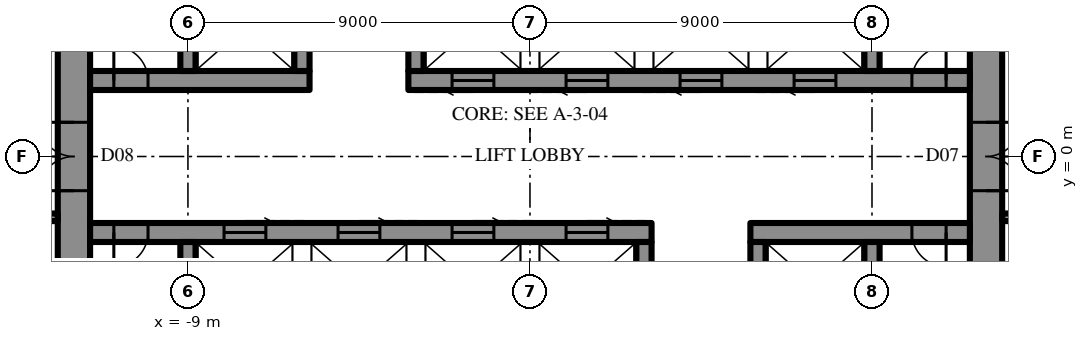
"""IFC4 building model, lengths in metres.
Left out: names, types, materials, properties, quantities, classifications, styles, units other than length and angle.
Written with IfcOpenShell. Run it as: python <this file> out.ifc"""

import sys

from ifc_helpers import new_model, si_unit, direction, frame, frame_2d, origin, place, context, subcontext, project, spatial, rectangle, extrude, element, fill, save


model = new_model("IFC4")
c1 = context("Model", 3, precision=1e-05, world=origin(), true_north=direction((0.0, 1.0)))
c2 = subcontext(c1, "Body", "Model", "MODEL_VIEW")
j1 = project(units=[si_unit("LENGTHUNIT", "METRE"), si_unit("PLANEANGLEUNIT", "RADIAN")], contexts=[c1])
p1 = place(None, origin())
s1 = spatial("IfcSite", under=j1, at=p1, CompositionType="ELEMENT")
p2 = place(p1, origin())
s2 = spatial("IfcBuilding", under=s1, at=p2, CompositionType="ELEMENT")
p3 = place(p2, frame((0.0, 0.0, 328.3)))
s3 = spatial("IfcBuildingStorey", under=s2, at=p3, CompositionType="ELEMENT", Elevation=328.3)
p4 = place(p3, frame((12.0, -10.7, 0.0), z_axis=(0.0, 0.0, 1.0), x_axis=(0.0, 1.0, 0.0)))
e1 = element("IfcWall", 1, at=p4, inside=s3, PredefinedType="SHEAR", context=c2, shape_type="SweptSolid", body=[
    extrude(rectangle(XDim=21.4, YDim=0.85, at=frame_2d((10.7, 0.0))), origin(), (0.0, 0.0, 1.0), 4.2),
])
p5 = place(p4, frame((9.8, 0.0, 0.0)))
e2 = element("IfcOpeningElement", 2, at=p5, cuts=e1, PredefinedType="OPENING", context=c2, shape_type="SweptSolid", body=[
    extrude(rectangle(XDim=1.8, YDim=2.4, at=frame_2d((0.9, 1.2))), frame((0.0, 0.435, 0.0), z_axis=(0.0, -1.0, 0.0), x_axis=(1.0, 0.0, 0.0)), (0.0, 0.0, 1.0), 0.87),
])
p6 = place(p3, frame((-12.0, 10.7, 0.0), z_axis=(0.0, 0.0, 1.0), x_axis=(0.0, -1.0, 0.0)))
e3 = element("IfcWall", 3, at=p6, inside=s3, PredefinedType="SHEAR", context=c2, shape_type="SweptSolid", body=[
    extrude(rectangle(XDim=21.4, YDim=0.85, at=frame_2d((10.7, 0.0))), origin(), (0.0, 0.0, 1.0), 4.2),
])
p7 = place(p6, frame((9.8, 0.0, 0.0)))
e4 = element("IfcOpeningElement", 4, at=p7, cuts=e3, PredefinedType="OPENING", context=c2, shape_type="SweptSolid", body=[
    extrude(rectangle(XDim=1.8, YDim=2.4, at=frame_2d((0.9, 1.2))), frame((0.0, 0.435, 0.0), z_axis=(0.0, -1.0, 0.0), x_axis=(1.0, 0.0, 0.0)), (0.0, 0.0, 1.0), 0.87),
])
p8 = place(p3, frame((-11.575, 2.0, 0.0), z_axis=(0.0, 0.0, 1.0), x_axis=(1.0, 0.0, 0.0)))
e5 = element("IfcWall", 5, at=p8, inside=s3, PredefinedType="SHEAR", context=c2, shape_type="SweptSolid", body=[
    extrude(rectangle(XDim=5.775, YDim=0.5, at=frame_2d((2.887, 0.0))), origin(), (0.0, 0.0, 1.0), 4.2),
])
p9 = place(p8, frame((0.625, 0.0, 0.0)))
e6 = element("IfcOpeningElement", 6, at=p9, cuts=e5, PredefinedType="OPENING", context=c2, shape_type="SweptSolid", body=[
    extrude(rectangle(XDim=0.9, YDim=2.2, at=frame_2d((0.45, 1.1))), frame((0.0, 0.26, 0.0), z_axis=(0.0, -1.0, 0.0), x_axis=(1.0, 0.0, 0.0)), (0.0, 0.0, 1.0), 0.52),
])
p10 = place(p3, frame((-3.2, 2.0, 0.0), z_axis=(0.0, 0.0, 1.0), x_axis=(1.0, 0.0, 0.0)))
e7 = element("IfcWall", 7, at=p10, inside=s3, PredefinedType="SHEAR", context=c2, shape_type="SweptSolid", body=[
    extrude(rectangle(XDim=14.775, YDim=0.5, at=frame_2d((7.387, 0.0))), origin(), (0.0, 0.0, 1.0), 4.2),
])
p11 = place(p10, frame((13.25, 0.0, 0.0)))
e8 = element("IfcOpeningElement", 8, at=p11, cuts=e7, PredefinedType="OPENING", context=c2, shape_type="SweptSolid", body=[
    extrude(rectangle(XDim=0.9, YDim=2.2, at=frame_2d((0.45, 1.1))), frame((0.0, 0.26, 0.0), z_axis=(0.0, -1.0, 0.0), x_axis=(1.0, 0.0, 0.0)), (0.0, 0.0, 1.0), 0.52),
])
p12 = place(p10, frame((1.15, 0.0, 0.0)))
e9 = element("IfcOpeningElement", 9, at=p12, cuts=e7, PredefinedType="OPENING", context=c2, shape_type="SweptSolid", body=[
    extrude(rectangle(XDim=1.1, YDim=2.2, at=frame_2d((0.55, 1.1))), frame((0.0, 0.26, 0.0), z_axis=(0.0, -1.0, 0.0), x_axis=(1.0, 0.0, 0.0)), (0.0, 0.0, 1.0), 0.52),
])
p13 = place(p10, frame((4.15, 0.0, 0.0)))
e10 = element("IfcOpeningElement", 10, at=p13, cuts=e7, PredefinedType="OPENING", context=c2, shape_type="SweptSolid", body=[
    extrude(rectangle(XDim=1.1, YDim=2.2, at=frame_2d((0.55, 1.1))), frame((0.0, 0.26, 0.0), z_axis=(0.0, -1.0, 0.0), x_axis=(1.0, 0.0, 0.0)), (0.0, 0.0, 1.0), 0.52),
])
p14 = place(p10, frame((7.15, 0.0, 0.0)))
e11 = element("IfcOpeningElement", 11, at=p14, cuts=e7, PredefinedType="OPENING", context=c2, shape_type="SweptSolid", body=[
    extrude(rectangle(XDim=1.1, YDim=2.2, at=frame_2d((0.55, 1.1))), frame((0.0, 0.26, 0.0), z_axis=(0.0, -1.0, 0.0), x_axis=(1.0, 0.0, 0.0)), (0.0, 0.0, 1.0), 0.52),
])
p15 = place(p10, frame((10.15, 0.0, 0.0)))
e12 = element("IfcOpeningElement", 12, at=p15, cuts=e7, PredefinedType="OPENING", context=c2, shape_type="SweptSolid", body=[
    extrude(rectangle(XDim=1.1, YDim=2.2, at=frame_2d((0.55, 1.1))), frame((0.0, 0.26, 0.0), z_axis=(0.0, -1.0, 0.0), x_axis=(1.0, 0.0, 0.0)), (0.0, 0.0, 1.0), 0.52),
])
for number, where, z_axis, x_axis in (
    (13, (-9.0, 2.25, 0.0), (0.0, 0.0, 1.0), (0.0, 1.0, 0.0)),
    (14, (-6.0, 2.25, 0.0), (0.0, 0.0, 1.0), (0.0, 1.0, 0.0)),
    (15, (-3.0, 2.25, 0.0), (0.0, 0.0, 1.0), (0.0, 1.0, 0.0)),
    (16, (9.0, 2.25, 0.0), (0.0, 0.0, 1.0), (0.0, 1.0, 0.0)),
):
    element("IfcWall", number, at=place(p3, frame(where, z_axis=z_axis, x_axis=x_axis)), inside=s3, PredefinedType="SHEAR", context=c2, shape_type="SweptSolid", body=[
        extrude(rectangle(XDim=2.3, YDim=0.4, at=frame_2d((1.15, 0.0))), origin(), (0.0, 0.0, 1.0), 4.2),
    ])
p16 = place(p3, frame((11.575, -2.0, 0.0), z_axis=(0.0, 0.0, 1.0), x_axis=(-1.0, 0.0, 0.0)))
e17 = element("IfcWall", 17, at=p16, inside=s3, PredefinedType="SHEAR", context=c2, shape_type="SweptSolid", body=[
    extrude(rectangle(XDim=5.775, YDim=0.5, at=frame_2d((2.887, 0.0))), origin(), (0.0, 0.0, 1.0), 4.2),
])
p17 = place(p16, frame((0.625, 0.0, 0.0)))
e18 = element("IfcOpeningElement", 18, at=p17, cuts=e17, PredefinedType="OPENING", context=c2, shape_type="SweptSolid", body=[
    extrude(rectangle(XDim=0.9, YDim=2.2, at=frame_2d((0.45, 1.1))), frame((0.0, 0.26, 0.0), z_axis=(0.0, -1.0, 0.0), x_axis=(1.0, 0.0, 0.0)), (0.0, 0.0, 1.0), 0.52),
])
p18 = place(p3, frame((3.2, -2.0, 0.0), z_axis=(0.0, 0.0, 1.0), x_axis=(-1.0, 0.0, 0.0)))
e19 = element("IfcWall", 19, at=p18, inside=s3, PredefinedType="SHEAR", context=c2, shape_type="SweptSolid", body=[
    extrude(rectangle(XDim=14.775, YDim=0.5, at=frame_2d((7.387, 0.0))), origin(), (0.0, 0.0, 1.0), 4.2),
])
p19 = place(p18, frame((13.25, 0.0, 0.0)))
e20 = element("IfcOpeningElement", 20, at=p19, cuts=e19, PredefinedType="OPENING", context=c2, shape_type="SweptSolid", body=[
    extrude(rectangle(XDim=0.9, YDim=2.2, at=frame_2d((0.45, 1.1))), frame((0.0, 0.26, 0.0), z_axis=(0.0, -1.0, 0.0), x_axis=(1.0, 0.0, 0.0)), (0.0, 0.0, 1.0), 0.52),
])
p20 = place(p18, frame((1.15, 0.0, 0.0)))
e21 = element("IfcOpeningElement", 21, at=p20, cuts=e19, PredefinedType="OPENING", context=c2, shape_type="SweptSolid", body=[
    extrude(rectangle(XDim=1.1, YDim=2.2, at=frame_2d((0.55, 1.1))), frame((0.0, 0.26, 0.0), z_axis=(0.0, -1.0, 0.0), x_axis=(1.0, 0.0, 0.0)), (0.0, 0.0, 1.0), 0.52),
])
p21 = place(p18, frame((4.15, 0.0, 0.0)))
e22 = element("IfcOpeningElement", 22, at=p21, cuts=e19, PredefinedType="OPENING", context=c2, shape_type="SweptSolid", body=[
    extrude(rectangle(XDim=1.1, YDim=2.2, at=frame_2d((0.55, 1.1))), frame((0.0, 0.26, 0.0), z_axis=(0.0, -1.0, 0.0), x_axis=(1.0, 0.0, 0.0)), (0.0, 0.0, 1.0), 0.52),
])
p22 = place(p18, frame((7.15, 0.0, 0.0)))
e23 = element("IfcOpeningElement", 23, at=p22, cuts=e19, PredefinedType="OPENING", context=c2, shape_type="SweptSolid", body=[
    extrude(rectangle(XDim=1.1, YDim=2.2, at=frame_2d((0.55, 1.1))), frame((0.0, 0.26, 0.0), z_axis=(0.0, -1.0, 0.0), x_axis=(1.0, 0.0, 0.0)), (0.0, 0.0, 1.0), 0.52),
])
p23 = place(p18, frame((10.15, 0.0, 0.0)))
e24 = element("IfcOpeningElement", 24, at=p23, cuts=e19, PredefinedType="OPENING", context=c2, shape_type="SweptSolid", body=[
    extrude(rectangle(XDim=1.1, YDim=2.2, at=frame_2d((0.55, 1.1))), frame((0.0, 0.26, 0.0), z_axis=(0.0, -1.0, 0.0), x_axis=(1.0, 0.0, 0.0)), (0.0, 0.0, 1.0), 0.52),
])
for number, where, z_axis, x_axis in (
    (25, (9.0, -2.25, 0.0), (0.0, 0.0, 1.0), (0.0, -1.0, 0.0)),
    (26, (6.0, -2.25, 0.0), (0.0, 0.0, 1.0), (0.0, -1.0, 0.0)),
    (27, (3.0, -2.25, 0.0), (0.0, 0.0, 1.0), (0.0, -1.0, 0.0)),
    (28, (-9.0, -2.25, 0.0), (0.0, 0.0, 1.0), (0.0, -1.0, 0.0)),
):
    element("IfcWall", number, at=place(p3, frame(where, z_axis=z_axis, x_axis=x_axis)), inside=s3, PredefinedType="SHEAR", context=c2, shape_type="SweptSolid", body=[
        extrude(rectangle(XDim=2.3, YDim=0.4, at=frame_2d((1.15, 0.0))), origin(), (0.0, 0.0, 1.0), 4.2),
    ])
p24 = place(p3, frame((12.425, -1.6, 0.0), z_axis=(0.0, 0.0, 1.0), x_axis=(1.0, 0.0, 0.0)))
e29 = element("IfcWall", 29, at=p24, inside=s3, PredefinedType="PARTITIONING", context=c2, shape_type="SweptSolid", body=[
    extrude(rectangle(XDim=16.327, YDim=0.2, at=frame_2d((8.164, 0.0))), origin(), (0.0, 0.0, 1.0), 4.0),
])
p25 = place(p24, frame((1.133, 0.0, 0.0)))
e30 = element("IfcOpeningElement", 30, at=p25, cuts=e29, PredefinedType="OPENING", context=c2, shape_type="SweptSolid", body=[
    extrude(rectangle(XDim=1.0, YDim=2.2, at=frame_2d((0.5, 1.1))), frame((0.0, 0.11, 0.0), z_axis=(0.0, -1.0, 0.0), x_axis=(1.0, 0.0, 0.0)), (0.0, 0.0, 1.0), 0.22),
])
p26 = place(p3, frame((-12.425, -1.6, 0.0), z_axis=(0.0, 0.0, 1.0), x_axis=(-1.0, 0.0, 0.0)))
e31 = element("IfcWall", 31, at=p26, inside=s3, PredefinedType="PARTITIONING", context=c2, shape_type="SweptSolid", body=[
    extrude(rectangle(XDim=16.327, YDim=0.2, at=frame_2d((8.164, 0.0))), origin(), (0.0, 0.0, 1.0), 4.0),
])
p27 = place(p26, frame((1.133, 0.0, 0.0)))
e32 = element("IfcOpeningElement", 32, at=p27, cuts=e31, PredefinedType="OPENING", context=c2, shape_type="SweptSolid", body=[
    extrude(rectangle(XDim=1.0, YDim=2.2, at=frame_2d((0.5, 1.1))), frame((0.0, 0.11, 0.0), z_axis=(0.0, -1.0, 0.0), x_axis=(1.0, 0.0, 0.0)), (0.0, 0.0, 1.0), 0.22),
])
p28 = place(p5, frame((1.8, 0.0, 0.0), z_axis=(0.0, 0.0, 1.0), x_axis=(-1.0, 0.0, 0.0)))
e33 = element("IfcDoor", 33, at=p28, inside=s3, OperationType="DOUBLE_DOOR_SINGLE_SWING", PredefinedType="DOOR", context=c2, shape_type="SweptSolid", body=[
    extrude(rectangle(XDim=1.8, YDim=2.4, at=frame_2d((0.9, 1.2))), frame((0.0, 0.025, 0.0), z_axis=(0.0, -1.0, 0.0), x_axis=(1.0, 0.0, 0.0)), (0.0, 0.0, 1.0), 0.05),
])
fill(e2, e33)
p29 = place(p7, frame((1.8, 0.0, 0.0), z_axis=(0.0, 0.0, 1.0), x_axis=(-1.0, 0.0, 0.0)))
e34 = element("IfcDoor", 34, at=p29, inside=s3, OperationType="DOUBLE_DOOR_SINGLE_SWING", PredefinedType="DOOR", context=c2, shape_type="SweptSolid", body=[
    extrude(rectangle(XDim=1.8, YDim=2.4, at=frame_2d((0.9, 1.2))), frame((0.0, 0.025, 0.0), z_axis=(0.0, -1.0, 0.0), x_axis=(1.0, 0.0, 0.0)), (0.0, 0.0, 1.0), 0.05),
])
fill(e4, e34)
p30 = place(p9, origin())
e35 = element("IfcDoor", 35, at=p30, inside=s3, OperationType="SINGLE_SWING_RIGHT", PredefinedType="DOOR", context=c2, shape_type="SweptSolid", body=[
    extrude(rectangle(XDim=0.9, YDim=2.2, at=frame_2d((0.45, 1.1))), frame((0.0, 0.025, 0.0), z_axis=(0.0, -1.0, 0.0), x_axis=(1.0, 0.0, 0.0)), (0.0, 0.0, 1.0), 0.05),
])
fill(e6, e35)
p31 = place(p11, origin())
e36 = element("IfcDoor", 36, at=p31, inside=s3, OperationType="SINGLE_SWING_LEFT", PredefinedType="DOOR", context=c2, shape_type="SweptSolid", body=[
    extrude(rectangle(XDim=0.9, YDim=2.2, at=frame_2d((0.45, 1.1))), frame((0.0, 0.025, 0.0), z_axis=(0.0, -1.0, 0.0), x_axis=(1.0, 0.0, 0.0)), (0.0, 0.0, 1.0), 0.05),
])
fill(e8, e36)
p32 = place(p17, origin())
e37 = element("IfcDoor", 37, at=p32, inside=s3, OperationType="SINGLE_SWING_RIGHT", PredefinedType="DOOR", context=c2, shape_type="SweptSolid", body=[
    extrude(rectangle(XDim=0.9, YDim=2.2, at=frame_2d((0.45, 1.1))), frame((0.0, 0.025, 0.0), z_axis=(0.0, -1.0, 0.0), x_axis=(1.0, 0.0, 0.0)), (0.0, 0.0, 1.0), 0.05),
])
fill(e18, e37)
p33 = place(p19, origin())
e38 = element("IfcDoor", 38, at=p33, inside=s3, OperationType="SINGLE_SWING_LEFT", PredefinedType="DOOR", context=c2, shape_type="SweptSolid", body=[
    extrude(rectangle(XDim=0.9, YDim=2.2, at=frame_2d((0.45, 1.1))), frame((0.0, 0.025, 0.0), z_axis=(0.0, -1.0, 0.0), x_axis=(1.0, 0.0, 0.0)), (0.0, 0.0, 1.0), 0.05),
])
fill(e20, e38)
p34 = place(p12, frame((1.1, 0.0, 0.0), z_axis=(0.0, 0.0, 1.0), x_axis=(-1.0, 0.0, 0.0)))
e39 = element("IfcDoor", 39, at=p34, inside=s3, OperationType="SLIDING_TO_LEFT", PredefinedType="DOOR", context=c2, shape_type="SweptSolid", body=[
    extrude(rectangle(XDim=1.1, YDim=2.2, at=frame_2d((0.55, 1.1))), frame((0.0, 0.025, 0.0), z_axis=(0.0, -1.0, 0.0), x_axis=(1.0, 0.0, 0.0)), (0.0, 0.0, 1.0), 0.05),
])
fill(e9, e39)
p35 = place(p13, frame((1.1, 0.0, 0.0), z_axis=(0.0, 0.0, 1.0), x_axis=(-1.0, 0.0, 0.0)))
e40 = element("IfcDoor", 40, at=p35, inside=s3, OperationType="SLIDING_TO_LEFT", PredefinedType="DOOR", context=c2, shape_type="SweptSolid", body=[
    extrude(rectangle(XDim=1.1, YDim=2.2, at=frame_2d((0.55, 1.1))), frame((0.0, 0.025, 0.0), z_axis=(0.0, -1.0, 0.0), x_axis=(1.0, 0.0, 0.0)), (0.0, 0.0, 1.0), 0.05),
])
fill(e10, e40)
p36 = place(p14, frame((1.1, 0.0, 0.0), z_axis=(0.0, 0.0, 1.0), x_axis=(-1.0, 0.0, 0.0)))
e41 = element("IfcDoor", 41, at=p36, inside=s3, OperationType="SLIDING_TO_LEFT", PredefinedType="DOOR", context=c2, shape_type="SweptSolid", body=[
    extrude(rectangle(XDim=1.1, YDim=2.2, at=frame_2d((0.55, 1.1))), frame((0.0, 0.025, 0.0), z_axis=(0.0, -1.0, 0.0), x_axis=(1.0, 0.0, 0.0)), (0.0, 0.0, 1.0), 0.05),
])
fill(e11, e41)
p37 = place(p15, frame((1.1, 0.0, 0.0), z_axis=(0.0, 0.0, 1.0), x_axis=(-1.0, 0.0, 0.0)))
e42 = element("IfcDoor", 42, at=p37, inside=s3, OperationType="SLIDING_TO_LEFT", PredefinedType="DOOR", context=c2, shape_type="SweptSolid", body=[
    extrude(rectangle(XDim=1.1, YDim=2.2, at=frame_2d((0.55, 1.1))), frame((0.0, 0.025, 0.0), z_axis=(0.0, -1.0, 0.0), x_axis=(1.0, 0.0, 0.0)), (0.0, 0.0, 1.0), 0.05),
])
fill(e12, e42)
p38 = place(p20, frame((1.1, 0.0, 0.0), z_axis=(0.0, 0.0, 1.0), x_axis=(-1.0, 0.0, 0.0)))
e43 = element("IfcDoor", 43, at=p38, inside=s3, OperationType="SLIDING_TO_LEFT", PredefinedType="DOOR", context=c2, shape_type="SweptSolid", body=[
    extrude(rectangle(XDim=1.1, YDim=2.2, at=frame_2d((0.55, 1.1))), frame((0.0, 0.025, 0.0), z_axis=(0.0, -1.0, 0.0), x_axis=(1.0, 0.0, 0.0)), (0.0, 0.0, 1.0), 0.05),
])
fill(e21, e43)
p39 = place(p21, frame((1.1, 0.0, 0.0), z_axis=(0.0, 0.0, 1.0), x_axis=(-1.0, 0.0, 0.0)))
e44 = element("IfcDoor", 44, at=p39, inside=s3, OperationType="SLIDING_TO_LEFT", PredefinedType="DOOR", context=c2, shape_type="SweptSolid", body=[
    extrude(rectangle(XDim=1.1, YDim=2.2, at=frame_2d((0.55, 1.1))), frame((0.0, 0.025, 0.0), z_axis=(0.0, -1.0, 0.0), x_axis=(1.0, 0.0, 0.0)), (0.0, 0.0, 1.0), 0.05),
])
fill(e22, e44)
p40 = place(p22, frame((1.1, 0.0, 0.0), z_axis=(0.0, 0.0, 1.0), x_axis=(-1.0, 0.0, 0.0)))
e45 = element("IfcDoor", 45, at=p40, inside=s3, OperationType="SLIDING_TO_LEFT", PredefinedType="DOOR", context=c2, shape_type="SweptSolid", body=[
    extrude(rectangle(XDim=1.1, YDim=2.2, at=frame_2d((0.55, 1.1))), frame((0.0, 0.025, 0.0), z_axis=(0.0, -1.0, 0.0), x_axis=(1.0, 0.0, 0.0)), (0.0, 0.0, 1.0), 0.05),
])
fill(e23, e45)
p41 = place(p23, frame((1.1, 0.0, 0.0), z_axis=(0.0, 0.0, 1.0), x_axis=(-1.0, 0.0, 0.0)))
e46 = element("IfcDoor", 46, at=p41, inside=s3, OperationType="SLIDING_TO_LEFT", PredefinedType="DOOR", context=c2, shape_type="SweptSolid", body=[
    extrude(rectangle(XDim=1.1, YDim=2.2, at=frame_2d((0.55, 1.1))), frame((0.0, 0.025, 0.0), z_axis=(0.0, -1.0, 0.0), x_axis=(1.0, 0.0, 0.0)), (0.0, 0.0, 1.0), 0.05),
])
fill(e24, e46)
save(model, sys.argv[1])
